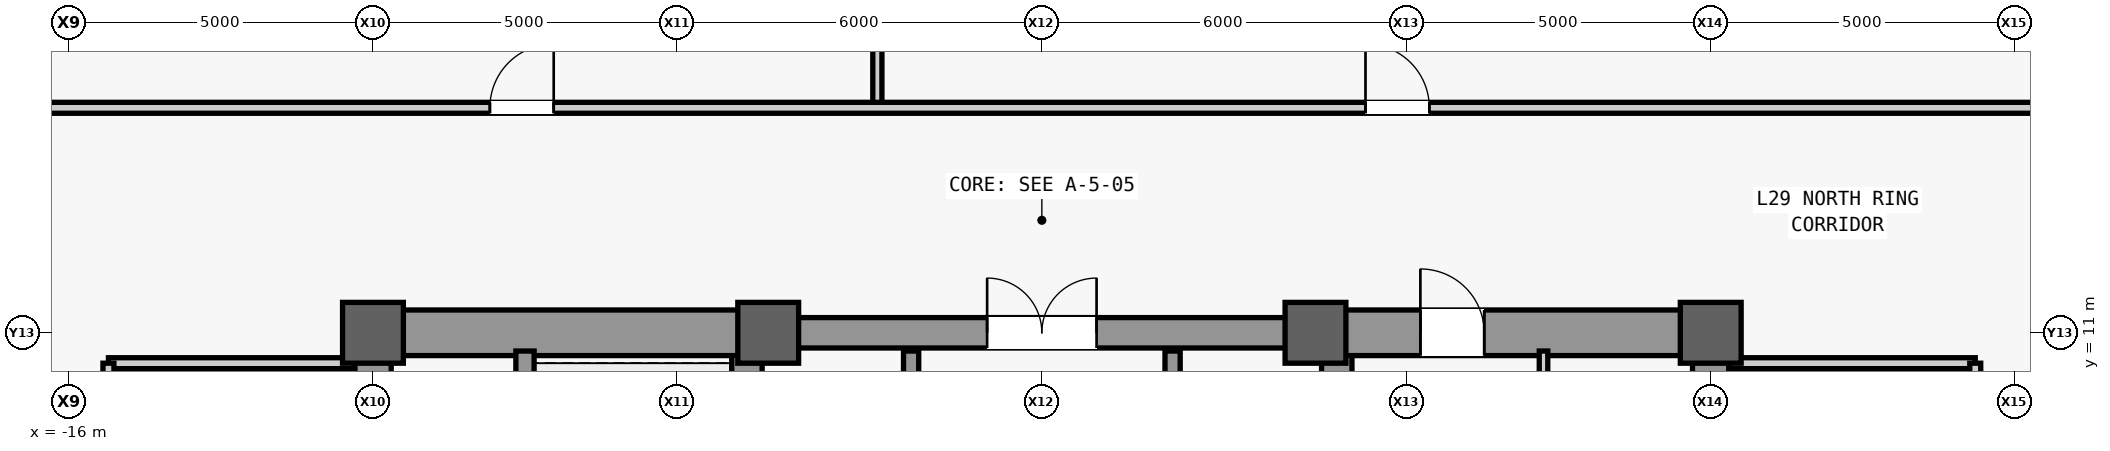
"""IFC4 building model, lengths in metres.
Left out: names, types, materials, properties, quantities, classifications, styles, units other than length and angle.
Written with IfcOpenShell. Run it as: python <this file> out.ifc"""

import sys

from ifc_helpers import new_model, si_unit, direction, frame, frame_2d, origin, origin_2d, place, context, subcontext, project, spatial, rectangle, extrude, source, transform, mapped, element, fill, save


model = new_model("IFC4")
c1 = context("Model", 3, precision=1e-05, world=origin(), true_north=direction((0.0, 1.0)))
c2 = subcontext(c1, "Body", "Model", "MODEL_VIEW")
j1 = project(units=[si_unit("LENGTHUNIT", "METRE"), si_unit("PLANEANGLEUNIT", "RADIAN")], contexts=[c1])
p1 = place(None, origin())
s1 = spatial("IfcSite", under=j1, at=p1, CompositionType="ELEMENT")
p2 = place(p1, origin())
s2 = spatial("IfcBuilding", under=s1, at=p2, CompositionType="ELEMENT")
p3 = place(p2, frame((0.0, 0.0, 128.3)))
s3 = spatial("IfcBuildingStorey", under=s2, at=p3, CompositionType="ELEMENT", Elevation=128.3)
m1 = source(origin(), c2, "Body", "SweptSolid", [
    extrude(rectangle(XDim=22.0, YDim=0.6, at=frame_2d((11.0, 0.0))), origin(), (0.0, 0.0, 1.0), 3.84),
])
p4 = place(p3, frame((-11.0, -11.0, 0.0), z_axis=(0.0, 0.0, 1.0), x_axis=(0.0, 1.0, 0.0)))
e1 = element("IfcWall", 1, at=p4, inside=s3, PredefinedType="SHEAR", context=c2, shape_type="MappedRepresentation", body=[
    mapped(m1, transform((0.0, 0.0, 0.0), scale=1.0)),
])
m2 = source(origin(), c2, "Body", "SweptSolid", [
    extrude(rectangle(XDim=1.1, YDim=2.2, at=frame_2d((0.55, 1.1))), frame((0.0, 0.31, 0.0), z_axis=(0.0, -1.0, 0.0), x_axis=(1.0, 0.0, 0.0)), (0.0, 0.0, 1.0), 0.62),
])
p5 = place(p4, frame((0.8, 0.0, 0.0)))
e2 = element("IfcOpeningElement", 2, at=p5, cuts=e1, PredefinedType="OPENING", context=c2, shape_type="MappedRepresentation", body=[
    mapped(m2, transform((0.0, 0.0, 0.0), scale=1.0)),
])
p6 = place(p4, frame((12.5, 0.0, 0.0)))
e3 = element("IfcOpeningElement", 3, at=p6, cuts=e1, PredefinedType="OPENING", context=c2, shape_type="MappedRepresentation", body=[
    mapped(m2, transform((0.0, 0.0, 0.0), scale=1.0)),
])
m3 = source(origin(), c2, "Body", "SweptSolid", [
    extrude(rectangle(XDim=0.9, YDim=2.15, at=frame_2d((0.45, 1.075))), frame((0.0, 0.31, 0.0), z_axis=(0.0, -1.0, 0.0), x_axis=(1.0, 0.0, 0.0)), (0.0, 0.0, 1.0), 0.62),
])
p7 = place(p4, frame((6.85, 0.0, 0.0)))
e4 = element("IfcOpeningElement", 4, at=p7, cuts=e1, PredefinedType="OPENING", context=c2, shape_type="MappedRepresentation", body=[
    mapped(m3, transform((0.0, 0.0, 0.0), scale=1.0)),
])
m4 = source(origin(), c2, "Body", "SweptSolid", [
    extrude(rectangle(XDim=1.3, YDim=2.3, at=frame_2d((0.65, 1.15))), frame((0.0, 0.31, 0.0), z_axis=(0.0, -1.0, 0.0), x_axis=(1.0, 0.0, 0.0)), (0.0, 0.0, 1.0), 0.62),
])
p8 = place(p4, frame((2.7, 0.0, 0.0)))
e5 = element("IfcOpeningElement", 5, at=p8, cuts=e1, PredefinedType="OPENING", context=c2, shape_type="MappedRepresentation", body=[
    mapped(m4, transform((0.0, 0.0, 0.0), scale=1.0)),
])
p9 = place(p3, frame((11.0, -11.0, 0.0), z_axis=(0.0, 0.0, 1.0), x_axis=(0.0, 1.0, 0.0)))
e6 = element("IfcWall", 6, at=p9, inside=s3, PredefinedType="SHEAR", context=c2, shape_type="MappedRepresentation", body=[
    mapped(m1, transform((0.0, 0.0, 0.0), scale=1.0)),
])
p10 = place(p9, frame((0.8, 0.0, 0.0)))
e7 = element("IfcOpeningElement", 7, at=p10, cuts=e6, PredefinedType="OPENING", context=c2, shape_type="MappedRepresentation", body=[
    mapped(m2, transform((0.0, 0.0, 0.0), scale=1.0)),
])
p11 = place(p9, frame((6.2, 0.0, 0.0)))
e8 = element("IfcOpeningElement", 8, at=p11, cuts=e6, PredefinedType="OPENING", context=c2, shape_type="MappedRepresentation", body=[
    mapped(m3, transform((0.0, 0.0, 0.0), scale=1.0)),
])
p12 = place(p9, frame((8.05, 0.0, 0.0)))
e9 = element("IfcOpeningElement", 9, at=p12, cuts=e6, PredefinedType="OPENING", context=c2, shape_type="MappedRepresentation", body=[
    mapped(m3, transform((0.0, 0.0, 0.0), scale=1.0)),
])
p13 = place(p9, frame((2.7, 0.0, 0.0)))
e10 = element("IfcOpeningElement", 10, at=p13, cuts=e6, PredefinedType="OPENING", context=c2, shape_type="MappedRepresentation", body=[
    mapped(m4, transform((0.0, 0.0, 0.0), scale=1.0)),
])
p14 = place(p9, frame((13.35, 0.0, 0.0)))
e11 = element("IfcOpeningElement", 11, at=p14, cuts=e6, PredefinedType="OPENING", context=c2, shape_type="MappedRepresentation", body=[
    mapped(m4, transform((0.0, 0.0, 0.0), scale=1.0)),
])
m5 = source(origin(), c2, "Body", "SweptSolid", [
    extrude(rectangle(XDim=21.4, YDim=0.5, at=frame_2d((10.7, 0.0))), origin(), (0.0, 0.0, 1.0), 3.84),
])
for number, where, z_axis, x_axis in (
    (12, (-4.85, -10.7, 0.0), (0.0, 0.0, 1.0), (0.0, 1.0, 0.0)),
    (13, (4.85, -10.7, 0.0), (0.0, 0.0, 1.0), (0.0, 1.0, 0.0)),
):
    element("IfcWall", number, at=place(p3, frame(where, z_axis=z_axis, x_axis=x_axis)), inside=s3, PredefinedType="SHEAR", context=c2, shape_type="MappedRepresentation", body=[
        mapped(m5, transform((0.0, 0.0, 0.0), scale=1.0)),
    ])
m6 = source(origin(), c2, "Body", "SweptSolid", [
    extrude(rectangle(XDim=5.85, YDim=0.75, at=frame_2d((2.925, 0.0))), origin(), (0.0, 0.0, 1.0), 3.84),
])
p15 = place(p3, frame((-10.7, 11.0, 0.0), z_axis=(0.0, 0.0, 1.0), x_axis=(1.0, 0.0, 0.0)))
e14 = element("IfcWall", 14, at=p15, inside=s3, PredefinedType="SHEAR", context=c2, shape_type="MappedRepresentation", body=[
    mapped(m6, transform((0.0, 0.0, 0.0), scale=1.0)),
])
p16 = place(p3, frame((4.85, 11.0, 0.0), z_axis=(0.0, 0.0, 1.0), x_axis=(1.0, 0.0, 0.0)))
e15 = element("IfcWall", 15, at=p16, inside=s3, PredefinedType="SHEAR", context=c2, shape_type="MappedRepresentation", body=[
    mapped(m6, transform((0.0, 0.0, 0.0), scale=1.0)),
])
m7 = source(origin(), c2, "Body", "SweptSolid", [
    extrude(rectangle(XDim=1.05, YDim=2.2, at=frame_2d((0.525, 1.1))), frame((0.0, 0.385, 0.0), z_axis=(0.0, -1.0, 0.0), x_axis=(1.0, 0.0, 0.0)), (0.0, 0.0, 1.0), 0.77),
])
p17 = place(p16, frame((1.375, 0.0, 0.0)))
e16 = element("IfcOpeningElement", 16, at=p17, cuts=e15, PredefinedType="OPENING", context=c2, shape_type="MappedRepresentation", body=[
    mapped(m7, transform((0.0, 0.0, 0.0), scale=1.0)),
])
m8 = source(origin(), c2, "Body", "SweptSolid", [
    extrude(rectangle(XDim=9.2, YDim=0.5, at=frame_2d((4.6, 0.0))), origin(), (0.0, 0.0, 1.0), 3.84),
])
p18 = place(p3, frame((-4.6, 11.0, 0.0), z_axis=(0.0, 0.0, 1.0), x_axis=(1.0, 0.0, 0.0)))
e17 = element("IfcWall", 17, at=p18, inside=s3, PredefinedType="SHEAR", context=c2, shape_type="MappedRepresentation", body=[
    mapped(m8, transform((0.0, 0.0, 0.0), scale=1.0)),
])
m9 = source(origin(), c2, "Body", "SweptSolid", [
    extrude(rectangle(XDim=1.8, YDim=2.25, at=frame_2d((0.9, 1.125))), frame((0.0, 0.26, 0.0), z_axis=(0.0, -1.0, 0.0), x_axis=(1.0, 0.0, 0.0)), (0.0, 0.0, 1.0), 0.52),
])
p19 = place(p18, frame((3.7, 0.0, 0.0)))
e18 = element("IfcOpeningElement", 18, at=p19, cuts=e17, PredefinedType="OPENING", context=c2, shape_type="MappedRepresentation", body=[
    mapped(m9, transform((0.0, 0.0, 0.0), scale=1.0)),
])
m10 = source(origin(), c2, "Body", "SweptSolid", [
    extrude(rectangle(XDim=1.0, YDim=1.0, at=origin_2d()), origin(), (0.0, 0.0, 1.0), 4.1),
])
for number, where, z_axis, x_axis in (
    (19, (-11.0, 11.0, 0.0), (0.0, 0.0, 1.0), (1.0, 0.0, 0.0)),
    (20, (-4.5, 11.0, 0.0), (0.0, 0.0, 1.0), (1.0, 0.0, 0.0)),
    (21, (4.5, 11.0, 0.0), (0.0, 0.0, 1.0), (1.0, 0.0, 0.0)),
    (22, (11.0, 11.0, 0.0), (0.0, 0.0, 1.0), (1.0, 0.0, 0.0)),
):
    element("IfcColumn", number, at=place(p3, frame(where, z_axis=z_axis, x_axis=x_axis)), inside=s3, PredefinedType="COLUMN", context=c2, shape_type="MappedRepresentation", body=[
        mapped(m10, transform((0.0, 0.0, 0.0), scale=1.0)),
    ])
m11 = source(origin(), c2, "Body", "SweptSolid", [
    extrude(rectangle(XDim=7.75, YDim=0.3, at=frame_2d((3.875, 0.0))), origin(), (0.0, 0.0, 1.0), 3.84),
])
p20 = place(p3, frame((-8.5, 2.95, 0.0), z_axis=(0.0, 0.0, 1.0), x_axis=(0.0, 1.0, 0.0)))
e23 = element("IfcWall", 23, at=p20, inside=s3, PredefinedType="SHEAR", context=c2, shape_type="MappedRepresentation", body=[
    mapped(m11, transform((0.0, 0.0, 0.0), scale=1.0)),
])
m12 = source(origin(), c2, "Body", "SweptSolid", [
    extrude(rectangle(XDim=9.4, YDim=0.14, at=frame_2d((4.7, 0.0))), origin(), (0.0, 0.0, 1.0), 3.84),
])
p21 = place(p3, frame((8.25, 1.3, 0.0), z_axis=(0.0, 0.0, 1.0), x_axis=(0.0, 1.0, 0.0)))
e24 = element("IfcWall", 24, at=p21, inside=s3, PredefinedType="PARTITIONING", context=c2, shape_type="MappedRepresentation", body=[
    mapped(m12, transform((0.0, 0.0, 0.0), scale=1.0)),
])
m13 = source(origin(), c2, "Body", "SweptSolid", [
    extrude(rectangle(XDim=4.05, YDim=0.18, at=frame_2d((2.025, 0.0))), origin(), (0.0, 0.0, 1.0), 3.84),
])
p22 = place(p3, frame((-15.35, 10.5, 0.0), z_axis=(0.0, 0.0, 1.0), x_axis=(1.0, 0.0, 0.0)))
e25 = element("IfcWall", 25, at=p22, inside=s3, PredefinedType="PARTITIONING", context=c2, shape_type="MappedRepresentation", body=[
    mapped(m13, transform((0.0, 0.0, 0.0), scale=1.0)),
])
m14 = source(origin(), c2, "Body", "SweptSolid", [
    extrude(rectangle(XDim=16.6, YDim=0.18, at=frame_2d((8.3, 0.0))), origin(), (0.0, 0.0, 1.0), 3.84),
])
p23 = place(p3, frame((-15.35, -6.1, 0.0), z_axis=(0.0, 0.0, 1.0), x_axis=(0.0, 1.0, 0.0)))
e26 = element("IfcWall", 26, at=p23, inside=s3, PredefinedType="PARTITIONING", context=c2, shape_type="MappedRepresentation", body=[
    mapped(m14, transform((0.0, 0.0, 0.0), scale=1.0)),
])
m15 = source(origin(), c2, "Body", "SweptSolid", [
    extrude(rectangle(XDim=1.8, YDim=2.25, at=frame_2d((0.9, 1.125))), frame((0.0, 0.1, 0.0), z_axis=(0.0, -1.0, 0.0), x_axis=(1.0, 0.0, 0.0)), (0.0, 0.0, 1.0), 0.2),
])
p24 = place(p23, frame((2.7, 0.0, 0.0)))
e27 = element("IfcOpeningElement", 27, at=p24, cuts=e26, PredefinedType="OPENING", context=c2, shape_type="MappedRepresentation", body=[
    mapped(m15, transform((0.0, 0.0, 0.0), scale=1.0)),
])
p25 = place(p23, frame((11.0, 0.0, 0.0)))
e28 = element("IfcOpeningElement", 28, at=p25, cuts=e26, PredefinedType="OPENING", context=c2, shape_type="MappedRepresentation", body=[
    mapped(m15, transform((0.0, 0.0, 0.0), scale=1.0)),
])
p26 = place(p3, frame((11.3, 10.5, 0.0), z_axis=(0.0, 0.0, 1.0), x_axis=(1.0, 0.0, 0.0)))
e29 = element("IfcWall", 29, at=p26, inside=s3, PredefinedType="PARTITIONING", context=c2, shape_type="MappedRepresentation", body=[
    mapped(m13, transform((0.0, 0.0, 0.0), scale=1.0)),
])
p27 = place(p3, frame((15.35, -6.1, 0.0), z_axis=(0.0, 0.0, 1.0), x_axis=(0.0, 1.0, 0.0)))
e30 = element("IfcWall", 30, at=p27, inside=s3, PredefinedType="PARTITIONING", context=c2, shape_type="MappedRepresentation", body=[
    mapped(m14, transform((0.0, 0.0, 0.0), scale=1.0)),
])
p28 = place(p27, frame((2.7, 0.0, 0.0)))
e31 = element("IfcOpeningElement", 31, at=p28, cuts=e30, PredefinedType="OPENING", context=c2, shape_type="MappedRepresentation", body=[
    mapped(m15, transform((0.0, 0.0, 0.0), scale=1.0)),
])
p29 = place(p27, frame((13.0, 0.0, 0.0)))
e32 = element("IfcOpeningElement", 32, at=p29, cuts=e30, PredefinedType="OPENING", context=c2, shape_type="MappedRepresentation", body=[
    mapped(m15, transform((0.0, 0.0, 0.0), scale=1.0)),
])
m16 = source(origin(), c2, "Body", "SweptSolid", [
    extrude(rectangle(XDim=5.4, YDim=0.25, at=frame_2d((2.7, 0.0))), origin(), (0.0, 0.0, 1.0), 3.84),
])
for number, where, z_axis, x_axis in (
    (33, (-2.15, 5.3, 0.0), (0.0, 0.0, 1.0), (0.0, 1.0, 0.0)),
    (34, (2.15, 5.3, 0.0), (0.0, 0.0, 1.0), (0.0, 1.0, 0.0)),
):
    element("IfcWall", number, at=place(p3, frame(where, z_axis=z_axis, x_axis=x_axis)), inside=s3, PredefinedType="SHEAR", context=c2, shape_type="MappedRepresentation", body=[
        mapped(m16, transform((0.0, 0.0, 0.0), scale=1.0)),
    ])
m17 = source(origin(), c2, "Body", "SweptSolid", [
    extrude(rectangle(XDim=17.3, YDim=0.15, at=frame_2d((8.65, 0.0))), origin(), (0.0, 0.0, 1.0), 3.84),
])
p30 = place(p3, frame((-2.705, 14.7, 0.0), z_axis=(0.0, 0.0, 1.0), x_axis=(0.0, 1.0, 0.0)))
e35 = element("IfcWall", 35, at=p30, inside=s3, PredefinedType="PARTITIONING", context=c2, shape_type="MappedRepresentation", body=[
    mapped(m17, transform((0.0, 0.0, 0.0), scale=1.0)),
])
m18 = source(origin(), c2, "Body", "SweptSolid", [
    extrude(rectangle(XDim=37.1, YDim=0.18, at=frame_2d((18.55, 0.0))), origin(), (0.0, 0.0, 1.0), 3.84),
])
p31 = place(p3, frame((-19.4, 14.7, 0.0), z_axis=(0.0, 0.0, 1.0), x_axis=(1.0, 0.0, 0.0)))
e36 = element("IfcWall", 36, at=p31, inside=s3, PredefinedType="PARTITIONING", context=c2, shape_type="MappedRepresentation", body=[
    mapped(m18, transform((0.0, 0.0, 0.0), scale=1.0)),
])
m19 = source(origin(), c2, "Body", "SweptSolid", [
    extrude(rectangle(XDim=1.05, YDim=2.2, at=frame_2d((0.525, 1.1))), frame((0.0, 0.1, 0.0), z_axis=(0.0, -1.0, 0.0), x_axis=(1.0, 0.0, 0.0)), (0.0, 0.0, 1.0), 0.2),
])
p32 = place(p31, frame((10.323, 0.0, 0.0)))
e37 = element("IfcOpeningElement", 37, at=p32, cuts=e36, PredefinedType="OPENING", context=c2, shape_type="MappedRepresentation", body=[
    mapped(m19, transform((0.0, 0.0, 0.0), scale=1.0)),
])
p33 = place(p31, frame((24.722, 0.0, 0.0)))
e38 = element("IfcOpeningElement", 38, at=p33, cuts=e36, PredefinedType="OPENING", context=c2, shape_type="MappedRepresentation", body=[
    mapped(m19, transform((0.0, 0.0, 0.0), scale=1.0)),
])
m20 = source(origin(), c2, "Body", "SweptSolid", [
    extrude(rectangle(XDim=1.05, YDim=2.2, at=frame_2d((0.525, 1.1))), frame((0.0, 0.025, 0.0), z_axis=(0.0, -1.0, 0.0), x_axis=(1.0, 0.0, 0.0)), (0.0, 0.0, 1.0), 0.05),
])
p34 = place(p17, origin())
e39 = element("IfcDoor", 39, at=p34, inside=s3, OperationType="SINGLE_SWING_LEFT", PredefinedType="DOOR", context=c2, shape_type="MappedRepresentation", body=[
    mapped(m20, transform((0.0, 0.0, 0.0), scale=1.0)),
])
fill(e16, e39)
m21 = source(origin(), c2, "Body", "SweptSolid", [
    extrude(rectangle(XDim=1.8, YDim=2.25, at=frame_2d((0.9, 1.125))), frame((0.0, 0.025, 0.0), z_axis=(0.0, -1.0, 0.0), x_axis=(1.0, 0.0, 0.0)), (0.0, 0.0, 1.0), 0.05),
])
p35 = place(p19, origin())
e40 = element("IfcDoor", 40, at=p35, inside=s3, OperationType="SINGLE_SWING_RIGHT", PredefinedType="DOOR", context=c2, shape_type="MappedRepresentation", body=[
    mapped(m21, transform((0.0, 0.0, 0.0), scale=1.0)),
])
fill(e18, e40)
p36 = place(p32, origin())
e41 = element("IfcDoor", 41, at=p36, inside=s3, OperationType="SINGLE_SWING_RIGHT", PredefinedType="DOOR", context=c2, shape_type="MappedRepresentation", body=[
    mapped(m20, transform((0.0, 0.0, 0.0), scale=1.0)),
])
fill(e37, e41)
p37 = place(p33, origin())
e42 = element("IfcDoor", 42, at=p37, inside=s3, OperationType="SINGLE_SWING_LEFT", PredefinedType="DOOR", context=c2, shape_type="MappedRepresentation", body=[
    mapped(m20, transform((0.0, 0.0, 0.0), scale=1.0)),
])
fill(e38, e42)
save(model, sys.argv[1])
